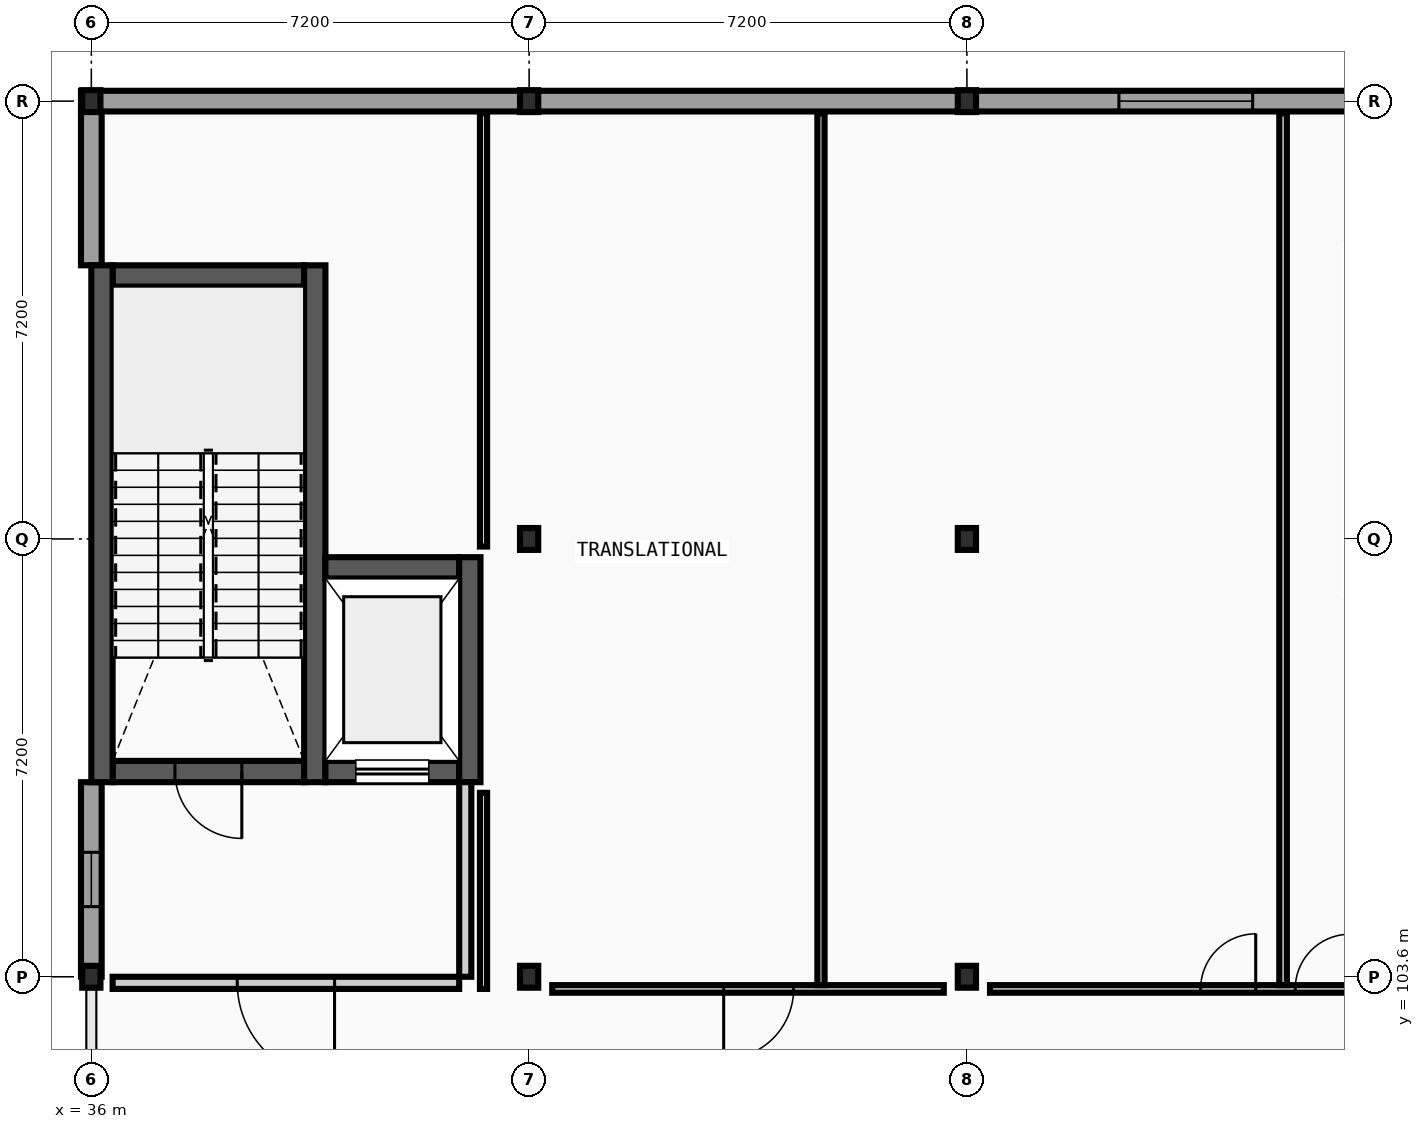
"""IFC4 building model, lengths in metres.
Left out: names, types, materials, properties, quantities, classifications, styles, units other than length and angle.
Written with IfcOpenShell. Run it as: python <this file> out.ifc"""

import sys

from ifc_helpers import new_model, si_unit, direction, frame, frame_2d, origin, origin_2d, place, context, subcontext, project, spatial, rectangle, i_section, extrude, element, fill, save


model = new_model("IFC4")
c1 = context("Model", 3, precision=1e-05, world=origin(), true_north=direction((0.0, 1.0)))
c2 = subcontext(c1, "Body", "Model", "MODEL_VIEW")
j1 = project(units=[si_unit("LENGTHUNIT", "METRE"), si_unit("PLANEANGLEUNIT", "RADIAN")], contexts=[c1])
p1 = place(None, origin())
s1 = spatial("IfcSite", under=j1, at=p1, CompositionType="ELEMENT")
p2 = place(p1, origin())
s2 = spatial("IfcBuilding", under=s1, at=p2, CompositionType="ELEMENT")
p3 = place(p2, frame((0.0, 0.0, 14.0)))
s3 = spatial("IfcBuildingStorey", under=s2, at=p3, CompositionType="ELEMENT", Elevation=14.0)
for number, where, z_axis, x_axis in (
    (1, (36.0, 103.6, 0.0), (0.0, 0.0, 1.0), (1.0, 0.0, 0.0)),
    (2, (36.0, 118.0, 0.0), (0.0, 0.0, 1.0), (1.0, 0.0, 0.0)),
    (3, (43.2, 103.6, 0.0), (0.0, 0.0, 1.0), (1.0, 0.0, 0.0)),
    (4, (43.2, 110.8, 0.0), (0.0, 0.0, 1.0), (1.0, 0.0, 0.0)),
    (5, (43.2, 118.0, 0.0), (0.0, 0.0, 1.0), (1.0, 0.0, 0.0)),
    (6, (50.4, 103.6, 0.0), (0.0, 0.0, 1.0), (1.0, 0.0, 0.0)),
    (7, (50.4, 110.8, 0.0), (0.0, 0.0, 1.0), (1.0, 0.0, 0.0)),
    (8, (50.4, 118.0, 0.0), (0.0, 0.0, 1.0), (1.0, 0.0, 0.0)),
):
    element("IfcColumn", number, at=place(p3, frame(where, z_axis=z_axis, x_axis=x_axis)), inside=s3, PredefinedType="COLUMN", context=c2, shape_type="SweptSolid", body=[
        extrude(i_section(OverallWidth=0.3, OverallDepth=0.36, WebThickness=0.012, FlangeThickness=0.022, FilletRadius=0.027, at=origin_2d()), origin(), (0.0, 0.0, 1.0), 4.4),
    ])
p4 = place(p3, frame((43.2, 118.0, 0.0), z_axis=(0.0, 0.0, 1.0), x_axis=(-1.0, 0.0, 0.0)))
e9 = element("IfcWall", 9, at=p4, inside=s3, PredefinedType="STANDARD", context=c2, shape_type="SweptSolid", body=[
    extrude(rectangle(XDim=7.37, YDim=0.34, at=frame_2d((3.685, 0.0))), origin(), (0.0, 0.0, 1.0), 3.935),
])
p5 = place(p3, frame((50.4, 118.0, 0.0), z_axis=(0.0, 0.0, 1.0), x_axis=(-1.0, 0.0, 0.0)))
e10 = element("IfcWall", 10, at=p5, inside=s3, PredefinedType="STANDARD", context=c2, shape_type="SweptSolid", body=[
    extrude(rectangle(XDim=7.2, YDim=0.34, at=frame_2d((3.6, 0.0))), origin(), (0.0, 0.0, 1.0), 3.935),
])
p6 = place(p3, frame((57.6, 118.0, 0.0), z_axis=(0.0, 0.0, 1.0), x_axis=(-1.0, 0.0, 0.0)))
e11 = element("IfcWall", 11, at=p6, inside=s3, PredefinedType="STANDARD", context=c2, shape_type="SweptSolid", body=[
    extrude(rectangle(XDim=7.2, YDim=0.34, at=frame_2d((3.6, 0.0))), origin(), (0.0, 0.0, 1.0), 3.935),
])
p7 = place(p6, frame((2.5, 0.0, 0.95)))
e12 = element("IfcOpeningElement", 12, at=p7, cuts=e11, PredefinedType="OPENING", context=c2, shape_type="SweptSolid", body=[
    extrude(rectangle(XDim=2.2, YDim=1.75, at=frame_2d((1.1, 0.875))), frame((0.0, 0.18, 0.0), z_axis=(0.0, -1.0, 0.0), x_axis=(1.0, 0.0, 0.0)), (0.0, 0.0, 1.0), 0.36),
])
p8 = place(p3, frame((36.0, 106.8, 0.0), z_axis=(0.0, 0.0, 1.0), x_axis=(0.0, -1.0, 0.0)))
e13 = element("IfcWall", 13, at=p8, inside=s3, PredefinedType="STANDARD", context=c2, shape_type="SweptSolid", body=[
    extrude(rectangle(XDim=3.2, YDim=0.34, at=frame_2d((1.6, 0.0))), origin(), (0.0, 0.0, 1.0), 4.2),
])
p9 = place(p8, frame((1.153, 0.0, 0.95)))
e14 = element("IfcOpeningElement", 14, at=p9, cuts=e13, PredefinedType="OPENING", context=c2, shape_type="SweptSolid", body=[
    extrude(rectangle(XDim=0.894, YDim=1.26, at=frame_2d((0.447, 0.63))), frame((0.0, 0.18, 0.0), z_axis=(0.0, -1.0, 0.0), x_axis=(1.0, 0.0, 0.0)), (0.0, 0.0, 1.0), 0.36),
])
p10 = place(p3, frame((36.0, 117.83, 0.0), z_axis=(0.0, 0.0, 1.0), x_axis=(0.0, -1.0, 0.0)))
e15 = element("IfcWall", 15, at=p10, inside=s3, PredefinedType="STANDARD", context=c2, shape_type="SweptSolid", body=[
    extrude(rectangle(XDim=2.53, YDim=0.34, at=frame_2d((1.265, 0.0))), origin(), (0.0, 0.0, 1.0), 4.2),
])
p11 = place(p3, frame((36.35, 106.975, 0.0), z_axis=(0.0, 0.0, 1.0), x_axis=(1.0, 0.0, 0.0)))
e16 = element("IfcWall", 16, at=p11, inside=s3, PredefinedType="SHEAR", context=c2, shape_type="SweptSolid", body=[
    extrude(rectangle(XDim=3.15, YDim=0.35, at=frame_2d((1.575, 0.0))), origin(), (0.0, 0.0, 1.0), 4.2),
])
p12 = place(p11, frame((1.025, 0.0, 0.0)))
e17 = element("IfcOpeningElement", 17, at=p12, cuts=e16, PredefinedType="OPENING", context=c2, shape_type="SweptSolid", body=[
    extrude(rectangle(XDim=1.1, YDim=2.15, at=frame_2d((0.55, 1.075))), frame((0.0, 0.185, 0.0), z_axis=(0.0, -1.0, 0.0), x_axis=(1.0, 0.0, 0.0)), (0.0, 0.0, 1.0), 0.37),
])
p13 = place(p3, frame((36.35, 115.125, 0.0), z_axis=(0.0, 0.0, 1.0), x_axis=(1.0, 0.0, 0.0)))
e18 = element("IfcWall", 18, at=p13, inside=s3, PredefinedType="SHEAR", context=c2, shape_type="SweptSolid", body=[
    extrude(rectangle(XDim=3.15, YDim=0.35, at=frame_2d((1.575, 0.0))), origin(), (0.0, 0.0, 1.0), 4.2),
])
for number, where, z_axis, x_axis in (
    (19, (36.175, 106.8, 0.0), (0.0, 0.0, 1.0), (0.0, 1.0, 0.0)),
    (20, (39.675, 106.8, 0.0), (0.0, 0.0, 1.0), (0.0, 1.0, 0.0)),
):
    element("IfcWall", number, at=place(p3, frame(where, z_axis=z_axis, x_axis=x_axis)), inside=s3, PredefinedType="SHEAR", context=c2, shape_type="SweptSolid", body=[
        extrude(rectangle(XDim=8.5, YDim=0.35, at=frame_2d((4.25, 0.0))), origin(), (0.0, 0.0, 1.0), 4.2),
    ])
p14 = place(p3, frame((39.85, 106.975, 0.0), z_axis=(0.0, 0.0, 1.0), x_axis=(1.0, 0.0, 0.0)))
e21 = element("IfcWall", 21, at=p14, inside=s3, PredefinedType="SHEAR", context=c2, shape_type="SweptSolid", body=[
    extrude(rectangle(XDim=2.2, YDim=0.35, at=frame_2d((1.1, 0.0))), origin(), (0.0, 0.0, 1.0), 4.2),
])
p15 = place(p14, frame((0.5, 0.0, 0.0)))
e22 = element("IfcOpeningElement", 22, at=p15, cuts=e21, PredefinedType="OPENING", context=c2, shape_type="SweptSolid", body=[
    extrude(rectangle(XDim=1.2, YDim=2.2, at=frame_2d((0.6, 1.1))), frame((0.0, 0.185, 0.0), z_axis=(0.0, -1.0, 0.0), x_axis=(1.0, 0.0, 0.0)), (0.0, 0.0, 1.0), 0.37),
])
p16 = place(p3, frame((39.85, 110.325, 0.0), z_axis=(0.0, 0.0, 1.0), x_axis=(1.0, 0.0, 0.0)))
e23 = element("IfcWall", 23, at=p16, inside=s3, PredefinedType="SHEAR", context=c2, shape_type="SweptSolid", body=[
    extrude(rectangle(XDim=2.2, YDim=0.35, at=frame_2d((1.1, 0.0))), origin(), (0.0, 0.0, 1.0), 4.2),
])
p17 = place(p3, frame((42.225, 106.8, 0.0), z_axis=(0.0, 0.0, 1.0), x_axis=(0.0, 1.0, 0.0)))
e24 = element("IfcWall", 24, at=p17, inside=s3, PredefinedType="SHEAR", context=c2, shape_type="SweptSolid", body=[
    extrude(rectangle(XDim=3.7, YDim=0.35, at=frame_2d((1.85, 0.0))), origin(), (0.0, 0.0, 1.0), 4.2),
])
p18 = place(p3, frame((36.35, 103.5, 0.0), z_axis=(0.0, 0.0, 1.0), x_axis=(1.0, 0.0, 0.0)))
e25 = element("IfcWall", 25, at=p18, inside=s3, PredefinedType="PARTITIONING", context=c2, shape_type="SweptSolid", body=[
    extrude(rectangle(XDim=5.7, YDim=0.2, at=frame_2d((2.85, 0.0))), origin(), (0.0, 0.0, 1.0), 3.935),
])
p19 = place(p18, frame((2.05, 0.0, 0.0)))
e26 = element("IfcOpeningElement", 26, at=p19, cuts=e25, PredefinedType="OPENING", context=c2, shape_type="SweptSolid", body=[
    extrude(rectangle(XDim=1.6, YDim=2.2, at=frame_2d((0.8, 1.1))), frame((0.0, 0.11, 0.0), z_axis=(0.0, -1.0, 0.0), x_axis=(1.0, 0.0, 0.0)), (0.0, 0.0, 1.0), 0.22),
])
p20 = place(p3, frame((42.15, 103.6, 0.0), z_axis=(0.0, 0.0, 1.0), x_axis=(0.0, 1.0, 0.0)))
e27 = element("IfcWall", 27, at=p20, inside=s3, PredefinedType="PARTITIONING", context=c2, shape_type="SweptSolid", body=[
    extrude(rectangle(XDim=3.2, YDim=0.2, at=frame_2d((1.6, 0.0))), origin(), (0.0, 0.0, 1.0), 4.2),
])
p21 = place(p3, frame((43.58, 103.4, 0.0), z_axis=(0.0, 0.0, 1.0), x_axis=(1.0, 0.0, 0.0)))
e28 = element("IfcWall", 28, at=p21, inside=s3, PredefinedType="PARTITIONING", context=c2, shape_type="SweptSolid", body=[
    extrude(rectangle(XDim=6.44, YDim=0.125, at=frame_2d((3.22, 0.0))), origin(), (0.0, 0.0, 1.0), 3.935),
])
p22 = place(p21, frame((2.82, 0.0, 0.0)))
e29 = element("IfcOpeningElement", 29, at=p22, cuts=e28, PredefinedType="OPENING", context=c2, shape_type="SweptSolid", body=[
    extrude(rectangle(XDim=1.15, YDim=2.15, at=frame_2d((0.575, 1.075))), frame((0.0, 0.073, 0.0), z_axis=(0.0, -1.0, 0.0), x_axis=(1.0, 0.0, 0.0)), (0.0, 0.0, 1.0), 0.145),
])
p23 = place(p3, frame((50.78, 103.4, 0.0), z_axis=(0.0, 0.0, 1.0), x_axis=(1.0, 0.0, 0.0)))
e30 = element("IfcWall", 30, at=p23, inside=s3, PredefinedType="PARTITIONING", context=c2, shape_type="SweptSolid", body=[
    extrude(rectangle(XDim=6.44, YDim=0.125, at=frame_2d((3.22, 0.0))), origin(), (0.0, 0.0, 1.0), 3.935),
])
p24 = place(p23, frame((5.02, 0.0, 0.0)))
e31 = element("IfcOpeningElement", 31, at=p24, cuts=e30, PredefinedType="OPENING", context=c2, shape_type="SweptSolid", body=[
    extrude(rectangle(XDim=0.9, YDim=2.1, at=frame_2d((0.45, 1.05))), frame((0.0, 0.073, 0.0), z_axis=(0.0, -1.0, 0.0), x_axis=(1.0, 0.0, 0.0)), (0.0, 0.0, 1.0), 0.145),
])
p25 = place(p23, frame((3.464, 0.0, 0.0)))
e32 = element("IfcOpeningElement", 32, at=p25, cuts=e30, PredefinedType="OPENING", context=c2, shape_type="SweptSolid", body=[
    extrude(rectangle(XDim=0.906, YDim=2.068, at=frame_2d((0.453, 1.034))), frame((0.0, 0.073, 0.0), z_axis=(0.0, -1.0, 0.0), x_axis=(1.0, 0.0, 0.0)), (0.0, 0.0, 1.0), 0.145),
])
p26 = place(p3, frame((42.45, 103.4, 0.0), z_axis=(0.0, 0.0, 1.0), x_axis=(0.0, 1.0, 0.0)))
e33 = element("IfcWall", 33, at=p26, inside=s3, PredefinedType="PARTITIONING", context=c2, shape_type="SweptSolid", body=[
    extrude(rectangle(XDim=3.225, YDim=0.118, at=frame_2d((1.613, 0.0))), origin(), (0.0, 0.0, 1.0), 4.2),
])
p27 = place(p3, frame((42.45, 110.675, 0.0), z_axis=(0.0, 0.0, 1.0), x_axis=(0.0, 1.0, 0.0)))
e34 = element("IfcWall", 34, at=p27, inside=s3, PredefinedType="PARTITIONING", context=c2, shape_type="SweptSolid", body=[
    extrude(rectangle(XDim=7.125, YDim=0.118, at=frame_2d((3.562, 0.0))), origin(), (0.0, 0.0, 1.0), 4.2),
])
p28 = place(p3, frame((48.0, 103.462, 0.0), z_axis=(0.0, 0.0, 1.0), x_axis=(0.0, 1.0, 0.0)))
e35 = element("IfcWall", 35, at=p28, inside=s3, PredefinedType="PARTITIONING", context=c2, shape_type="SweptSolid", body=[
    extrude(rectangle(XDim=14.338, YDim=0.118, at=frame_2d((7.169, 0.0))), origin(), (0.0, 0.0, 1.0), 3.945),
])
p29 = place(p3, frame((55.6, 103.462, 0.0), z_axis=(0.0, 0.0, 1.0), x_axis=(0.0, 1.0, 0.0)))
e36 = element("IfcWall", 36, at=p29, inside=s3, PredefinedType="PARTITIONING", context=c2, shape_type="SweptSolid", body=[
    extrude(rectangle(XDim=14.338, YDim=0.125, at=frame_2d((7.169, 0.0))), origin(), (0.0, 0.0, 1.0), 4.2),
])
p30 = place(p7, origin())
e37 = element("IfcWindow", 37, at=p30, inside=s3, PartitioningType="SINGLE_PANEL", PredefinedType="WINDOW", context=c2, shape_type="SweptSolid", body=[
    extrude(rectangle(XDim=2.2, YDim=1.75, at=frame_2d((1.1, 0.875))), frame((0.0, 0.03, 0.0), z_axis=(0.0, -1.0, 0.0), x_axis=(1.0, 0.0, 0.0)), (0.0, 0.0, 1.0), 0.06),
])
fill(e12, e37)
p31 = place(p9, origin())
e38 = element("IfcWindow", 38, at=p31, inside=s3, PartitioningType="SINGLE_PANEL", PredefinedType="WINDOW", context=c2, shape_type="SweptSolid", body=[
    extrude(rectangle(XDim=0.894, YDim=1.26, at=frame_2d((0.447, 0.63))), frame((0.0, 0.03, 0.0), z_axis=(0.0, -1.0, 0.0), x_axis=(1.0, 0.0, 0.0)), (0.0, 0.0, 1.0), 0.06),
])
fill(e14, e38)
p32 = place(p12, origin())
e39 = element("IfcDoor", 39, at=p32, inside=s3, OperationType="SINGLE_SWING_RIGHT", PredefinedType="DOOR", context=c2, shape_type="SweptSolid", body=[
    extrude(rectangle(XDim=1.1, YDim=2.15, at=frame_2d((0.55, 1.075))), frame((0.0, 0.025, 0.0), z_axis=(0.0, -1.0, 0.0), x_axis=(1.0, 0.0, 0.0)), (0.0, 0.0, 1.0), 0.05),
])
fill(e17, e39)
p33 = place(p15, origin())
e40 = element("IfcDoor", 40, at=p33, inside=s3, OperationType="SLIDING_TO_RIGHT", PredefinedType="DOOR", context=c2, shape_type="SweptSolid", body=[
    extrude(rectangle(XDim=1.2, YDim=2.2, at=frame_2d((0.6, 1.1))), frame((0.0, 0.025, 0.0), z_axis=(0.0, -1.0, 0.0), x_axis=(1.0, 0.0, 0.0)), (0.0, 0.0, 1.0), 0.05),
])
fill(e22, e40)
p34 = place(p19, origin())
e41 = element("IfcDoor", 41, at=p34, inside=s3, OperationType="DOUBLE_DOOR_SINGLE_SWING", PredefinedType="DOOR", context=c2, shape_type="SweptSolid", body=[
    extrude(rectangle(XDim=1.6, YDim=2.2, at=frame_2d((0.8, 1.1))), frame((0.0, 0.025, 0.0), z_axis=(0.0, -1.0, 0.0), x_axis=(1.0, 0.0, 0.0)), (0.0, 0.0, 1.0), 0.05),
])
fill(e26, e41)
p35 = place(p24, frame((0.9, 0.0, 0.0), z_axis=(0.0, 0.0, 1.0), x_axis=(-1.0, 0.0, 0.0)))
e42 = element("IfcDoor", 42, at=p35, inside=s3, OperationType="SINGLE_SWING_RIGHT", PredefinedType="DOOR", context=c2, shape_type="SweptSolid", body=[
    extrude(rectangle(XDim=0.9, YDim=2.1, at=frame_2d((0.45, 1.05))), frame((0.0, 0.025, 0.0), z_axis=(0.0, -1.0, 0.0), x_axis=(1.0, 0.0, 0.0)), (0.0, 0.0, 1.0), 0.05),
])
fill(e31, e42)
p36 = place(p22, frame((1.15, 0.0, 0.0), z_axis=(0.0, 0.0, 1.0), x_axis=(-1.0, 0.0, 0.0)))
e43 = element("IfcDoor", 43, at=p36, inside=s3, OperationType="SINGLE_SWING_LEFT", PredefinedType="DOOR", context=c2, shape_type="SweptSolid", body=[
    extrude(rectangle(XDim=1.15, YDim=2.15, at=frame_2d((0.575, 1.075))), frame((0.0, 0.025, 0.0), z_axis=(0.0, -1.0, 0.0), x_axis=(1.0, 0.0, 0.0)), (0.0, 0.0, 1.0), 0.05),
])
fill(e29, e43)
p37 = place(p25, frame((0.906, 0.0, 0.0), z_axis=(0.0, 0.0, 1.0), x_axis=(-1.0, 0.0, 0.0)))
e44 = element("IfcDoor", 44, at=p37, inside=s3, OperationType="SINGLE_SWING_RIGHT", PredefinedType="DOOR", context=c2, shape_type="SweptSolid", body=[
    extrude(rectangle(XDim=0.906, YDim=2.068, at=frame_2d((0.453, 1.034))), frame((0.0, 0.025, 0.0), z_axis=(0.0, -1.0, 0.0), x_axis=(1.0, 0.0, 0.0)), (0.0, 0.0, 1.0), 0.05),
])
fill(e32, e44)
save(model, sys.argv[1])
